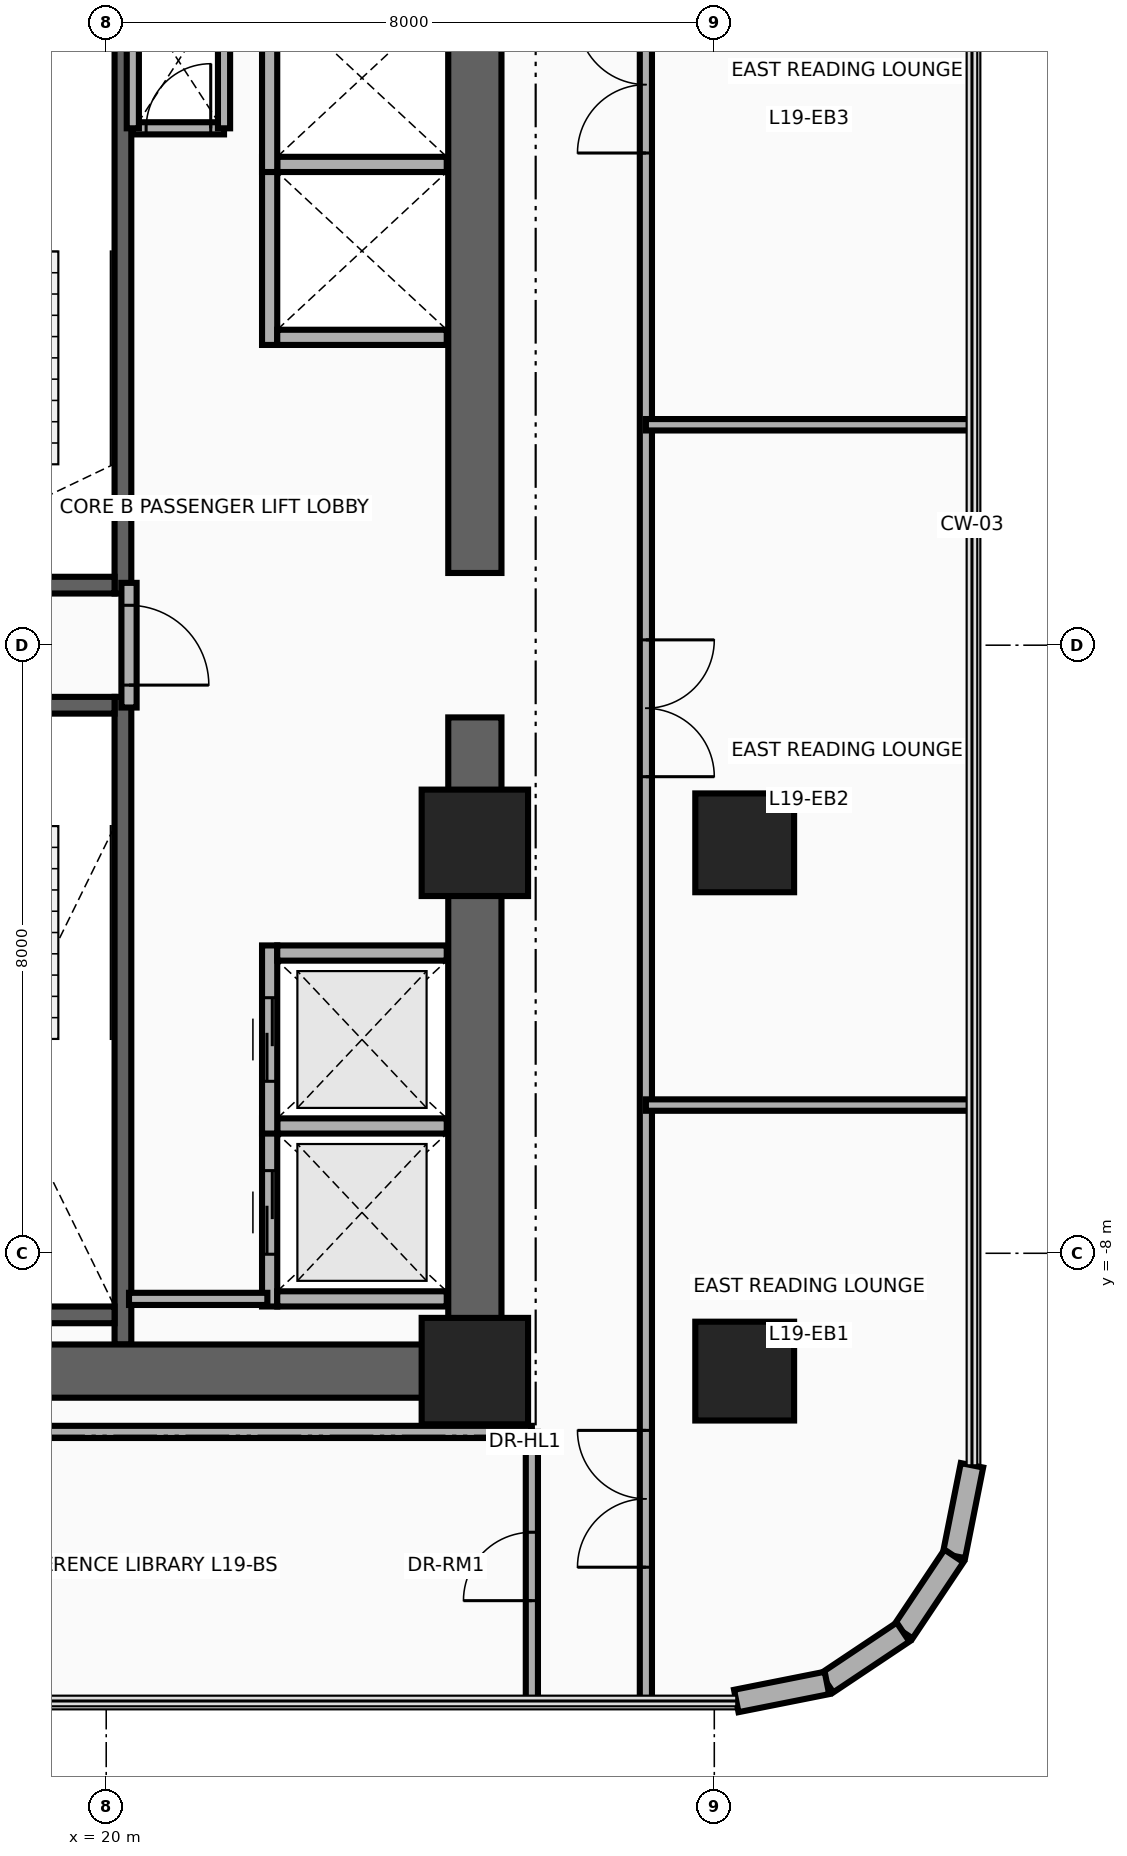
"""IFC4 building model, lengths in metres.
Left out: names, types, materials, properties, quantities, classifications, styles, units other than length and angle.
Written with IfcOpenShell. Run it as: python <this file> out.ifc"""

import sys

from ifc_helpers import new_model, si_unit, direction, frame, frame_2d, origin, origin_2d, place, context, subcontext, project, spatial, rectangle, circle, extrude, source, transform, mapped, element, fill, save


model = new_model("IFC4")
c1 = context("Model", 3, precision=1e-05, world=origin(), true_north=direction((0.0, 1.0)))
c2 = subcontext(c1, "Body", "Model", "MODEL_VIEW")
j1 = project(units=[si_unit("LENGTHUNIT", "METRE"), si_unit("PLANEANGLEUNIT", "RADIAN")], contexts=[c1])
p1 = place(None, origin())
s1 = spatial("IfcSite", under=j1, at=p1, CompositionType="ELEMENT")
p2 = place(p1, origin())
s2 = spatial("IfcBuilding", under=s1, at=p2, CompositionType="ELEMENT")
p3 = place(p2, frame((0.0, 0.0, 77.8)))
s3 = spatial("IfcBuildingStorey", under=s2, at=p3, CompositionType="ELEMENT", Elevation=77.8)
p4 = place(p3, frame((20.22, 0.68, 0.0), z_axis=(0.0, 0.0, 1.0), x_axis=(0.0, 1.0, 0.0)))
e1 = element("IfcWall", 1, at=p4, inside=s3, PredefinedType="SHEAR", context=c2, shape_type="SweptSolid", body=[
    extrude(rectangle(XDim=8.52, YDim=0.22, at=frame_2d((4.26, 0.0))), origin(), (0.0, 0.0, 1.0), 3.46),
])
p5 = place(p3, frame((17.0, 0.79, 0.0), z_axis=(0.0, 0.0, 1.0), x_axis=(1.0, 0.0, 0.0)))
e2 = element("IfcWall", 2, at=p5, inside=s3, PredefinedType="SHEAR", context=c2, shape_type="SweptSolid", body=[
    extrude(rectangle(XDim=3.11, YDim=0.22, at=frame_2d((1.555, 0.0))), origin(), (0.0, 0.0, 1.0), 3.46),
])
p6 = place(p5, frame((0.95, 0.0, 0.0)))
e3 = element("IfcOpeningElement", 3, at=p6, cuts=e2, PredefinedType="OPENING", context=c2, shape_type="SweptSolid", body=[
    extrude(rectangle(XDim=1.1, YDim=2.15, at=frame_2d((0.55, 1.075))), frame((0.0, 0.125, 0.0), z_axis=(0.0, -1.0, 0.0), x_axis=(1.0, 0.0, 0.0)), (0.0, 0.0, 1.0), 0.25),
])
p7 = place(p3, frame((20.22, -9.2, 0.0), z_axis=(0.0, 0.0, 1.0), x_axis=(0.0, 1.0, 0.0)))
e4 = element("IfcWall", 4, at=p7, inside=s3, PredefinedType="SHEAR", context=c2, shape_type="SweptSolid", body=[
    extrude(rectangle(XDim=8.52, YDim=0.22, at=frame_2d((4.26, 0.0))), origin(), (0.0, 0.0, 1.0), 3.46),
])
p8 = place(p3, frame((17.0, -8.81, 0.0), z_axis=(0.0, 0.0, 1.0), x_axis=(1.0, 0.0, 0.0)))
e5 = element("IfcWall", 5, at=p8, inside=s3, PredefinedType="SHEAR", context=c2, shape_type="SweptSolid", body=[
    extrude(rectangle(XDim=3.11, YDim=0.22, at=frame_2d((1.555, 0.0))), origin(), (0.0, 0.0, 1.0), 3.46),
])
p9 = place(p3, frame((17.0, -0.79, 0.0), z_axis=(0.0, 0.0, 1.0), x_axis=(1.0, 0.0, 0.0)))
e6 = element("IfcWall", 6, at=p9, inside=s3, PredefinedType="SHEAR", context=c2, shape_type="SweptSolid", body=[
    extrude(rectangle(XDim=3.11, YDim=0.22, at=frame_2d((1.555, 0.0))), origin(), (0.0, 0.0, 1.0), 3.46),
])
p10 = place(p9, frame((0.95, 0.0, 0.0)))
e7 = element("IfcOpeningElement", 7, at=p10, cuts=e6, PredefinedType="OPENING", context=c2, shape_type="SweptSolid", body=[
    extrude(rectangle(XDim=1.1, YDim=2.15, at=frame_2d((0.55, 1.075))), frame((0.0, 0.125, 0.0), z_axis=(0.0, -1.0, 0.0), x_axis=(1.0, 0.0, 0.0)), (0.0, 0.0, 1.0), 0.25),
])
for number, where, z_axis, x_axis in (
    (8, (24.85, -9.9, 0.0), (0.0, 0.0, 1.0), (0.0, 1.0, 0.0)),
    (9, (24.85, 0.95, 0.0), (0.0, 0.0, 1.0), (0.0, 1.0, 0.0)),
):
    element("IfcWall", number, at=place(p3, frame(where, z_axis=z_axis, x_axis=x_axis)), inside=s3, PredefinedType="SHEAR", context=c2, shape_type="SweptSolid", body=[
        extrude(rectangle(XDim=8.95, YDim=0.7, at=frame_2d((4.475, 0.0))), origin(), (0.0, 0.0, 1.0), 3.46),
    ])
p11 = place(p3, frame((15.85, -9.55, 0.0), z_axis=(0.0, 0.0, 1.0), x_axis=(1.0, 0.0, 0.0)))
e10 = element("IfcWall", 10, at=p11, inside=s3, PredefinedType="SHEAR", context=c2, shape_type="SweptSolid", body=[
    extrude(rectangle(XDim=9.0, YDim=0.7, at=frame_2d((4.5, 0.0))), origin(), (0.0, 0.0, 1.0), 3.46),
])
m1 = source(origin(), c2, "Body", "SweptSolid", [
    extrude(rectangle(XDim=1.4, YDim=1.4, at=origin_2d()), origin(), (0.0, 0.0, 1.0), 3.7),
])
p12 = place(p3, frame((24.85, -9.55, 0.0), z_axis=(0.0, 0.0, 1.0), x_axis=(1.0, 0.0, 0.0)))
e11 = element("IfcColumn", 11, at=p12, inside=s3, PredefinedType="COLUMN", context=c2, shape_type="MappedRepresentation", body=[
    mapped(m1, transform((0.0, 0.0, 0.0), x_axis=(1.0, 0.0, 0.0), y_axis=(0.0, 1.0, 0.0), z_axis=(0.0, 0.0, 1.0), scale=1.0)),
])
m2 = source(origin(), c2, "Body", "SweptSolid", [
    extrude(circle(Radius=0.65, at=origin_2d()), origin(), (0.0, 0.0, 1.0), 3.7),
])
p13 = place(p3, frame((28.4, -9.55, 0.0), z_axis=(0.0, 0.0, 1.0), x_axis=(1.0, 0.0, 0.0)))
e12 = element("IfcColumn", 12, at=p13, inside=s3, PredefinedType="COLUMN", context=c2, shape_type="MappedRepresentation", body=[
    mapped(m2, transform((0.0, 0.0, 0.0), x_axis=(1.0, 0.0, 0.0), y_axis=(0.0, 1.0, 0.0), z_axis=(0.0, 0.0, 1.0), scale=1.0)),
])
p14 = place(p3, frame((24.85, -2.6, 0.0), z_axis=(0.0, 0.0, 1.0), x_axis=(1.0, 0.0, 0.0)))
e13 = element("IfcColumn", 13, at=p14, inside=s3, PredefinedType="COLUMN", context=c2, shape_type="MappedRepresentation", body=[
    mapped(m1, transform((0.0, 0.0, 0.0), x_axis=(1.0, 0.0, 0.0), y_axis=(0.0, 1.0, 0.0), z_axis=(0.0, 0.0, 1.0), scale=1.0)),
])
p15 = place(p3, frame((28.4, -2.6, 0.0), z_axis=(0.0, 0.0, 1.0), x_axis=(1.0, 0.0, 0.0)))
e14 = element("IfcColumn", 14, at=p15, inside=s3, PredefinedType="COLUMN", context=c2, shape_type="MappedRepresentation", body=[
    mapped(m2, transform((0.0, 0.0, 0.0), x_axis=(1.0, 0.0, 0.0), y_axis=(0.0, 1.0, 0.0), z_axis=(0.0, 0.0, 1.0), scale=1.0)),
])
p16 = place(p3, frame((31.39, -10.789, 0.0), z_axis=(0.0, 0.0, 1.0), x_axis=(-0.194996050505, -0.980804027463, 0.0)))
e15 = element("IfcWall", 15, at=p16, inside=s3, PredefinedType="SOLIDWALL", context=c2, shape_type="SweptSolid", body=[
    extrude(rectangle(XDim=1.216, YDim=0.3, at=frame_2d((0.608, 0.0))), origin(), (0.0, 0.0, 1.0), 3.46),
])
for number, where, z_axis, x_axis in (
    (16, (31.153, -11.982, 0.0), (0.0, 0.0, 1.0), (-0.556, -0.831, 0.0)),
    (17, (30.483, -12.983, 0.0), (0.0, 0.0, 1.0), (-0.831, -0.556, 0.0)),
):
    element("IfcWall", number, at=place(p3, frame(where, z_axis=z_axis, x_axis=x_axis)), inside=s3, PredefinedType="SOLIDWALL", context=c2, shape_type="SweptSolid", body=[
        extrude(rectangle(XDim=1.205, YDim=0.3, at=frame_2d((0.603, 0.0))), origin(), (0.0, 0.0, 1.0), 3.46),
    ])
p17 = place(p3, frame((29.482, -13.653, 0.0), z_axis=(0.0, 0.0, 1.0), x_axis=(-0.980804027463, -0.194996050505, 0.0)))
e18 = element("IfcWall", 18, at=p17, inside=s3, PredefinedType="SOLIDWALL", context=c2, shape_type="SweptSolid", body=[
    extrude(rectangle(XDim=1.216, YDim=0.3, at=frame_2d((0.608, 0.0))), origin(), (0.0, 0.0, 1.0), 3.46),
])
p18 = place(p3, frame((22.15, -8.7, 0.0), z_axis=(0.0, 0.0, 1.0), x_axis=(0.0, 1.0, 0.0)))
e19 = element("IfcWall", 19, at=p18, inside=s3, PredefinedType="MOVABLE", context=c2, shape_type="SweptSolid", body=[
    extrude(rectangle(XDim=2.475, YDim=0.2, at=frame_2d((1.237, 0.0))), origin(), (0.0, 0.0, 1.0), 3.46),
])
p19 = place(p18, frame((0.688, 0.0, 0.0)))
e20 = element("IfcOpeningElement", 20, at=p19, cuts=e19, PredefinedType="OPENING", context=c2, shape_type="SweptSolid", body=[
    extrude(rectangle(XDim=1.1, YDim=2.1, at=frame_2d((0.55, 1.05))), frame((0.0, 0.115, 0.0), z_axis=(0.0, -1.0, 0.0), x_axis=(1.0, 0.0, 0.0)), (0.0, 0.0, 1.0), 0.23),
])
for number, where, z_axis, x_axis in (
    (21, (22.25, -8.6, 0.0), (0.0, 0.0, 1.0), (1.0, 0.0, 0.0)),
    (22, (22.25, -6.325, 0.0), (0.0, 0.0, 1.0), (1.0, 0.0, 0.0)),
):
    element("IfcWall", number, at=place(p3, frame(where, z_axis=z_axis, x_axis=x_axis)), inside=s3, PredefinedType="MOVABLE", context=c2, shape_type="SweptSolid", body=[
        extrude(rectangle(XDim=2.23, YDim=0.2, at=frame_2d((1.115, 0.0))), origin(), (0.0, 0.0, 1.0), 3.46),
    ])
p20 = place(p3, frame((22.15, -6.425, 0.0), z_axis=(0.0, 0.0, 1.0), x_axis=(0.0, 1.0, 0.0)))
e23 = element("IfcWall", 23, at=p20, inside=s3, PredefinedType="MOVABLE", context=c2, shape_type="SweptSolid", body=[
    extrude(rectangle(XDim=2.475, YDim=0.2, at=frame_2d((1.238, 0.0))), origin(), (0.0, 0.0, 1.0), 3.46),
])
p21 = place(p20, frame((0.688, 0.0, 0.0)))
e24 = element("IfcOpeningElement", 24, at=p21, cuts=e23, PredefinedType="OPENING", context=c2, shape_type="SweptSolid", body=[
    extrude(rectangle(XDim=1.1, YDim=2.1, at=frame_2d((0.55, 1.05))), frame((0.0, 0.115, 0.0), z_axis=(0.0, -1.0, 0.0), x_axis=(1.0, 0.0, 0.0)), (0.0, 0.0, 1.0), 0.23),
])
p22 = place(p3, frame((22.25, -4.05, 0.0), z_axis=(0.0, 0.0, 1.0), x_axis=(1.0, 0.0, 0.0)))
e25 = element("IfcWall", 25, at=p22, inside=s3, PredefinedType="MOVABLE", context=c2, shape_type="SweptSolid", body=[
    extrude(rectangle(XDim=2.23, YDim=0.2, at=frame_2d((1.115, 0.0))), origin(), (0.0, 0.0, 1.0), 3.46),
])
p23 = place(p3, frame((22.15, 3.95, 0.0), z_axis=(0.0, 0.0, 1.0), x_axis=(0.0, 1.0, 0.0)))
e26 = element("IfcWall", 26, at=p23, inside=s3, PredefinedType="MOVABLE", context=c2, shape_type="SweptSolid", body=[
    extrude(rectangle(XDim=2.475, YDim=0.2, at=frame_2d((1.238, 0.0))), origin(), (0.0, 0.0, 1.0), 3.46),
])
for number, where, z_axis, x_axis in (
    (27, (22.25, 4.05, 0.0), (0.0, 0.0, 1.0), (1.0, 0.0, 0.0)),
    (28, (22.25, 6.325, 0.0), (0.0, 0.0, 1.0), (1.0, 0.0, 0.0)),
):
    element("IfcWall", number, at=place(p3, frame(where, z_axis=z_axis, x_axis=x_axis)), inside=s3, PredefinedType="MOVABLE", context=c2, shape_type="SweptSolid", body=[
        extrude(rectangle(XDim=2.23, YDim=0.2, at=frame_2d((1.115, 0.0))), origin(), (0.0, 0.0, 1.0), 2.245),
    ])
p24 = place(p3, frame((22.15, 6.225, 0.0), z_axis=(0.0, 0.0, 1.0), x_axis=(0.0, 1.0, 0.0)))
e29 = element("IfcWall", 29, at=p24, inside=s3, PredefinedType="MOVABLE", context=c2, shape_type="SweptSolid", body=[
    extrude(rectangle(XDim=2.475, YDim=0.2, at=frame_2d((1.237, 0.0))), origin(), (0.0, 0.0, 1.0), 3.46),
])
p25 = place(p3, frame((20.3, -0.82, 0.0), z_axis=(0.0, 0.0, 1.0), x_axis=(0.0, 1.0, 0.0)))
e30 = element("IfcWall", 30, at=p25, inside=s3, PredefinedType="PARTITIONING", context=c2, shape_type="SweptSolid", body=[
    extrude(rectangle(XDim=1.64, YDim=0.2, at=frame_2d((0.82, 0.0))), origin(), (0.0, 0.0, 1.0), 3.46),
])
p26 = place(p25, frame((0.295, 0.0, 0.0)))
e31 = element("IfcOpeningElement", 31, at=p26, cuts=e30, PredefinedType="OPENING", context=c2, shape_type="SweptSolid", body=[
    extrude(rectangle(XDim=1.05, YDim=2.15, at=frame_2d((0.525, 1.075))), frame((0.0, 0.115, 0.0), z_axis=(0.0, -1.0, 0.0), x_axis=(1.0, 0.0, 0.0)), (0.0, 0.0, 1.0), 0.23),
])
p27 = place(p3, frame((20.35, 6.8, 0.0), z_axis=(0.0, 0.0, 1.0), x_axis=(1.0, 0.0, 0.0)))
e32 = element("IfcWall", 32, at=p27, inside=s3, PredefinedType="PARTITIONING", context=c2, shape_type="SweptSolid", body=[
    extrude(rectangle(XDim=1.2, YDim=0.16, at=frame_2d((0.6, 0.0))), origin(), (0.0, 0.0, 1.0), 3.46),
])
p28 = place(p27, frame((0.175, 0.0, 0.0)))
e33 = element("IfcOpeningElement", 33, at=p28, cuts=e32, PredefinedType="OPENING", context=c2, shape_type="SweptSolid", body=[
    extrude(rectangle(XDim=0.85, YDim=2.05, at=frame_2d((0.425, 1.025))), frame((0.0, 0.095, 0.0), z_axis=(0.0, -1.0, 0.0), x_axis=(1.0, 0.0, 0.0)), (0.0, 0.0, 1.0), 0.19),
])
for number, where, z_axis, x_axis in (
    (34, (21.55, 6.8, 0.0), (0.0, 0.0, 1.0), (0.0, 1.0, 0.0)),
    (35, (20.35, 6.8, 0.0), (0.0, 0.0, 1.0), (0.0, 1.0, 0.0)),
):
    element("IfcWall", number, at=place(p3, frame(where, z_axis=z_axis, x_axis=x_axis)), inside=s3, PredefinedType="PARTITIONING", context=c2, shape_type="SweptSolid", body=[
        extrude(rectangle(XDim=1.8, YDim=0.16, at=frame_2d((0.9, 0.0))), origin(), (0.0, 0.0, 1.0), 3.46),
    ])
p29 = place(p3, frame((20.3, -8.6, 0.0), z_axis=(0.0, 0.0, 1.0), x_axis=(1.0, 0.0, 0.0)))
e36 = element("IfcWall", 36, at=p29, inside=s3, PredefinedType="PARTITIONING", context=c2, shape_type="SweptSolid", body=[
    extrude(rectangle(XDim=1.82, YDim=0.16, at=frame_2d((0.91, 0.0))), origin(), (0.0, 0.0, 1.0), 3.46),
])
p30 = place(p3, frame((25.6, -13.89, 0.0), z_axis=(0.0, 0.0, 1.0), x_axis=(0.0, 1.0, 0.0)))
e37 = element("IfcWall", 37, at=p30, inside=s3, PredefinedType="PARTITIONING", context=c2, shape_type="SweptSolid", body=[
    extrude(rectangle(XDim=3.54, YDim=0.16, at=frame_2d((1.77, 0.0))), origin(), (0.0, 0.0, 1.0), 3.46),
])
p31 = place(p30, frame((1.32, 0.0, 0.0)))
e38 = element("IfcOpeningElement", 38, at=p31, cuts=e37, PredefinedType="OPENING", context=c2, shape_type="SweptSolid", body=[
    extrude(rectangle(XDim=0.9, YDim=2.1, at=frame_2d((0.45, 1.05))), frame((0.0, 0.095, 0.0), z_axis=(0.0, -1.0, 0.0), x_axis=(1.0, 0.0, 0.0)), (0.0, 0.0, 1.0), 0.19),
])
p32 = place(p3, frame((13.41, -10.35, 0.0), z_axis=(0.0, 0.0, 1.0), x_axis=(1.0, 0.0, 0.0)))
e39 = element("IfcWall", 39, at=p32, inside=s3, PredefinedType="PARTITIONING", context=c2, shape_type="SweptSolid", body=[
    extrude(rectangle(XDim=12.19, YDim=0.16, at=frame_2d((6.095, 0.0))), origin(), (0.0, 0.0, 1.0), 3.46),
])
p33 = place(p3, frame((27.1, -13.89, 0.0), z_axis=(0.0, 0.0, 1.0), x_axis=(0.0, 1.0, 0.0)))
e40 = element("IfcWall", 40, at=p33, inside=s3, PredefinedType="PARTITIONING", context=c2, shape_type="SweptSolid", body=[
    extrude(rectangle(XDim=25.74, YDim=0.16, at=frame_2d((12.87, 0.0))), origin(), (0.0, 0.0, 1.0), 2.583),
])
p34 = place(p33, frame((1.76, 0.0, 0.0)))
e41 = element("IfcOpeningElement", 41, at=p34, cuts=e40, PredefinedType="OPENING", context=c2, shape_type="SweptSolid", body=[
    extrude(rectangle(XDim=1.8, YDim=2.15, at=frame_2d((0.9, 1.075))), frame((0.0, 0.095, 0.0), z_axis=(0.0, -1.0, 0.0), x_axis=(1.0, 0.0, 0.0)), (0.0, 0.0, 1.0), 0.19),
])
p35 = place(p33, frame((12.16, 0.0, 0.0)))
e42 = element("IfcOpeningElement", 42, at=p35, cuts=e40, PredefinedType="OPENING", context=c2, shape_type="SweptSolid", body=[
    extrude(rectangle(XDim=1.8, YDim=2.15, at=frame_2d((0.9, 1.075))), frame((0.0, 0.095, 0.0), z_axis=(0.0, -1.0, 0.0), x_axis=(1.0, 0.0, 0.0)), (0.0, 0.0, 1.0), 0.19),
])
p36 = place(p33, frame((20.365, 0.0, 0.0)))
e43 = element("IfcOpeningElement", 43, at=p36, cuts=e40, PredefinedType="OPENING", context=c2, shape_type="SweptSolid", body=[
    extrude(rectangle(XDim=1.8, YDim=2.15, at=frame_2d((0.9, 1.075))), frame((0.0, 0.095, 0.0), z_axis=(0.0, -1.0, 0.0), x_axis=(1.0, 0.0, 0.0)), (0.0, 0.0, 1.0), 0.19),
])
for number, where, z_axis, x_axis in (
    (44, (27.1, -6.05, 0.0), (0.0, 0.0, 1.0), (1.0, 0.0, 0.0)),
    (45, (27.1, 2.9, 0.0), (0.0, 0.0, 1.0), (1.0, 0.0, 0.0)),
):
    element("IfcWall", number, at=place(p3, frame(where, z_axis=z_axis, x_axis=x_axis)), inside=s3, PredefinedType="PARTITIONING", context=c2, shape_type="SweptSolid", body=[
        extrude(rectangle(XDim=4.29, YDim=0.15, at=frame_2d((2.145, 0.0))), origin(), (0.0, 0.0, 1.0), 2.896),
    ])
p37 = place(p19, origin())
e46 = element("IfcDoor", 46, at=p37, inside=s3, OperationType="DOUBLE_DOOR_SLIDING", PredefinedType="DOOR", context=c2, shape_type="SweptSolid", body=[
    extrude(rectangle(XDim=1.1, YDim=2.1, at=frame_2d((0.55, 1.05))), frame((0.0, 0.025, 0.0), z_axis=(0.0, -1.0, 0.0), x_axis=(1.0, 0.0, 0.0)), (0.0, 0.0, 1.0), 0.05),
])
fill(e20, e46)
p38 = place(p21, origin())
e47 = element("IfcDoor", 47, at=p38, inside=s3, OperationType="DOUBLE_DOOR_SLIDING", PredefinedType="DOOR", context=c2, shape_type="SweptSolid", body=[
    extrude(rectangle(XDim=1.1, YDim=2.1, at=frame_2d((0.55, 1.05))), frame((0.0, 0.025, 0.0), z_axis=(0.0, -1.0, 0.0), x_axis=(1.0, 0.0, 0.0)), (0.0, 0.0, 1.0), 0.05),
])
fill(e24, e47)
p39 = place(p26, frame((1.05, 0.0, 0.0), z_axis=(0.0, 0.0, 1.0), x_axis=(-1.0, 0.0, 0.0)))
e48 = element("IfcDoor", 48, at=p39, inside=s3, OperationType="SINGLE_SWING_LEFT", PredefinedType="DOOR", context=c2, shape_type="SweptSolid", body=[
    extrude(rectangle(XDim=1.05, YDim=2.15, at=frame_2d((0.525, 1.075))), frame((0.0, 0.025, 0.0), z_axis=(0.0, -1.0, 0.0), x_axis=(1.0, 0.0, 0.0)), (0.0, 0.0, 1.0), 0.05),
])
fill(e31, e48)
p40 = place(p28, origin())
e49 = element("IfcDoor", 49, at=p40, inside=s3, OperationType="SINGLE_SWING_RIGHT", PredefinedType="DOOR", context=c2, shape_type="SweptSolid", body=[
    extrude(rectangle(XDim=0.85, YDim=2.05, at=frame_2d((0.425, 1.025))), frame((0.0, 0.025, 0.0), z_axis=(0.0, -1.0, 0.0), x_axis=(1.0, 0.0, 0.0)), (0.0, 0.0, 1.0), 0.05),
])
fill(e33, e49)
p41 = place(p31, origin())
e50 = element("IfcDoor", 50, at=p41, inside=s3, OperationType="SINGLE_SWING_RIGHT", PredefinedType="DOOR", context=c2, shape_type="SweptSolid", body=[
    extrude(rectangle(XDim=0.9, YDim=2.1, at=frame_2d((0.45, 1.05))), frame((0.0, 0.025, 0.0), z_axis=(0.0, -1.0, 0.0), x_axis=(1.0, 0.0, 0.0)), (0.0, 0.0, 1.0), 0.05),
])
fill(e38, e50)
p42 = place(p34, origin())
e51 = element("IfcDoor", 51, at=p42, inside=s3, OperationType="DOUBLE_DOOR_SINGLE_SWING", PredefinedType="DOOR", context=c2, shape_type="SweptSolid", body=[
    extrude(rectangle(XDim=1.8, YDim=2.15, at=frame_2d((0.9, 1.075))), frame((0.0, 0.025, 0.0), z_axis=(0.0, -1.0, 0.0), x_axis=(1.0, 0.0, 0.0)), (0.0, 0.0, 1.0), 0.05),
])
fill(e41, e51)
p43 = place(p35, frame((1.8, 0.0, 0.0), z_axis=(0.0, 0.0, 1.0), x_axis=(-1.0, 0.0, 0.0)))
e52 = element("IfcDoor", 52, at=p43, inside=s3, OperationType="DOUBLE_DOOR_SINGLE_SWING", PredefinedType="DOOR", context=c2, shape_type="SweptSolid", body=[
    extrude(rectangle(XDim=1.8, YDim=2.15, at=frame_2d((0.9, 1.075))), frame((0.0, 0.025, 0.0), z_axis=(0.0, -1.0, 0.0), x_axis=(1.0, 0.0, 0.0)), (0.0, 0.0, 1.0), 0.05),
])
fill(e42, e52)
p44 = place(p36, origin())
e53 = element("IfcDoor", 53, at=p44, inside=s3, OperationType="DOUBLE_DOOR_SINGLE_SWING", PredefinedType="DOOR", context=c2, shape_type="SweptSolid", body=[
    extrude(rectangle(XDim=1.8, YDim=2.15, at=frame_2d((0.9, 1.075))), frame((0.0, 0.025, 0.0), z_axis=(0.0, -1.0, 0.0), x_axis=(1.0, 0.0, 0.0)), (0.0, 0.0, 1.0), 0.05),
])
fill(e43, e53)
save(model, sys.argv[1])
